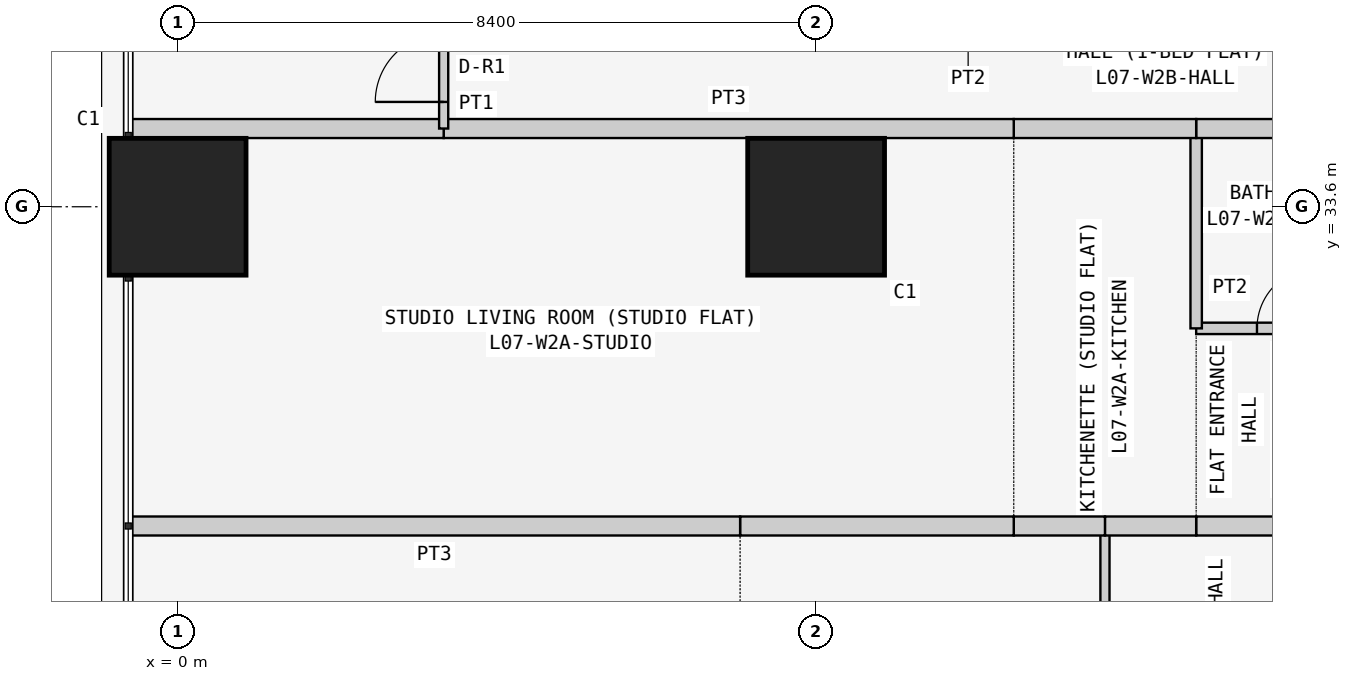
"""IFC4 building model, lengths in metres.
Left out: names, types, materials, properties, quantities, classifications, styles, units other than length and angle.
Written with IfcOpenShell. Run it as: python <this file> out.ifc"""

import sys

from ifc_helpers import new_model, si_unit, direction, frame, frame_2d, origin, origin_2d, place, context, subcontext, project, spatial, rectangle, extrude, element, fill, save


model = new_model("IFC4")
c1 = context("Model", 3, precision=1e-05, world=origin(), true_north=direction((0.0, 1.0)))
c2 = subcontext(c1, "Body", "Model", "MODEL_VIEW")
j1 = project(units=[si_unit("LENGTHUNIT", "METRE"), si_unit("PLANEANGLEUNIT", "RADIAN")], contexts=[c1])
p1 = place(None, origin())
s1 = spatial("IfcSite", under=j1, at=p1, CompositionType="ELEMENT")
p2 = place(p1, origin())
s2 = spatial("IfcBuilding", under=s1, at=p2, CompositionType="ELEMENT")
p3 = place(p2, frame((0.0, 0.0, 34.5)))
s3 = spatial("IfcBuildingStorey", under=s2, at=p3, CompositionType="ELEMENT", Elevation=34.5)
for number, where, z_axis, x_axis in (
    (1, (0.0, 33.6, 0.0), (0.0, 0.0, 1.0), (1.0, 0.0, 0.0)),
    (2, (8.4, 33.6, 0.0), (0.0, 0.0, 1.0), (1.0, 0.0, 0.0)),
):
    element("IfcColumn", number, at=place(p3, frame(where, z_axis=z_axis, x_axis=x_axis)), inside=s3, PredefinedType="COLUMN", context=c2, shape_type="SweptSolid", body=[
        extrude(rectangle(XDim=1.8, YDim=1.8, at=origin_2d()), origin(), (0.0, 0.0, 1.0), 3.6),
    ])
p4 = place(p3, frame((12.2, 29.4, 0.0), z_axis=(0.0, 0.0, 1.0), x_axis=(0.0, -1.0, 0.0)))
e3 = element("IfcWall", 3, at=p4, inside=s3, PredefinedType="PARTITIONING", context=c2, shape_type="SweptSolid", body=[
    extrude(rectangle(XDim=5.229, YDim=0.12, at=frame_2d((2.615, 0.0))), origin(), (0.0, 0.0, 1.0), 3.45),
])
p5 = place(p4, frame((1.05, 0.0, 0.0)))
e4 = element("IfcOpeningElement", 4, at=p5, cuts=e3, PredefinedType="OPENING", context=c2, shape_type="SweptSolid", body=[
    extrude(rectangle(XDim=0.9, YDim=2.1, at=frame_2d((0.45, 1.05))), frame((0.0, 0.07, 0.0), z_axis=(0.0, -1.0, 0.0), x_axis=(1.0, 0.0, 0.0)), (0.0, 0.0, 1.0), 0.14),
])
p6 = place(p3, frame((15.775, 29.4, 0.0), z_axis=(0.0, 0.0, 1.0), x_axis=(-1.0, 0.0, 0.0)))
e5 = element("IfcWall", 5, at=p6, inside=s3, PredefinedType="PARTITIONING", context=c2, shape_type="SweptSolid", body=[
    extrude(rectangle(XDim=2.375, YDim=0.25, at=frame_2d((1.188, 0.0))), origin(), (0.0, 0.0, 1.0), 3.45),
])
for number, where, z_axis, x_axis in (
    (6, (13.4, 29.4, 0.0), (0.0, 0.0, 1.0), (-1.0, 0.0, 0.0)),
    (7, (12.2, 29.4, 0.0), (0.0, 0.0, 1.0), (-1.0, 0.0, 0.0)),
):
    element("IfcWall", number, at=place(p3, frame(where, z_axis=z_axis, x_axis=x_axis)), inside=s3, PredefinedType="PARTITIONING", context=c2, shape_type="SweptSolid", body=[
        extrude(rectangle(XDim=1.2, YDim=0.25, at=frame_2d((0.6, 0.0))), origin(), (0.0, 0.0, 1.0), 3.45),
    ])
p7 = place(p3, frame((11.0, 29.4, 0.0), z_axis=(0.0, 0.0, 1.0), x_axis=(-1.0, 0.0, 0.0)))
e8 = element("IfcWall", 8, at=p7, inside=s3, PredefinedType="PARTITIONING", context=c2, shape_type="SweptSolid", body=[
    extrude(rectangle(XDim=3.6, YDim=0.25, at=frame_2d((1.8, 0.0))), origin(), (0.0, 0.0, 1.0), 3.45),
])
p8 = place(p3, frame((7.4, 29.4, 0.0), z_axis=(0.0, 0.0, 1.0), x_axis=(-1.0, 0.0, 0.0)))
e9 = element("IfcWall", 9, at=p8, inside=s3, PredefinedType="PARTITIONING", context=c2, shape_type="SweptSolid", body=[
    extrude(rectangle(XDim=8.05, YDim=0.25, at=frame_2d((4.025, 0.0))), origin(), (0.0, 0.0, 1.0), 3.45),
])
p9 = place(p3, frame((13.4, 32.0, 0.0), z_axis=(0.0, 0.0, 1.0), x_axis=(1.0, 0.0, 0.0)))
e10 = element("IfcWall", 10, at=p9, inside=s3, PredefinedType="PARTITIONING", context=c2, shape_type="SweptSolid", body=[
    extrude(rectangle(XDim=2.375, YDim=0.15, at=frame_2d((1.188, 0.0))), origin(), (0.0, 0.0, 1.0), 3.45),
])
p10 = place(p9, frame((0.8, 0.0, 0.0)))
e11 = element("IfcOpeningElement", 11, at=p10, cuts=e10, PredefinedType="OPENING", context=c2, shape_type="SweptSolid", body=[
    extrude(rectangle(XDim=0.8, YDim=2.1, at=frame_2d((0.4, 1.05))), frame((0.0, 0.085, 0.0), z_axis=(0.0, -1.0, 0.0), x_axis=(1.0, 0.0, 0.0)), (0.0, 0.0, 1.0), 0.17),
])
p11 = place(p3, frame((13.4, 32.0, 0.0), z_axis=(0.0, 0.0, 1.0), x_axis=(0.0, 1.0, 0.0)))
e12 = element("IfcWall", 12, at=p11, inside=s3, PredefinedType="PARTITIONING", context=c2, shape_type="SweptSolid", body=[
    extrude(rectangle(XDim=2.629, YDim=0.15, at=frame_2d((1.314, 0.0))), origin(), (0.0, 0.0, 1.0), 3.45),
])
p12 = place(p3, frame((13.4, 34.629, 0.0), z_axis=(0.0, 0.0, 1.0), x_axis=(1.0, 0.0, 0.0)))
e13 = element("IfcWall", 13, at=p12, inside=s3, PredefinedType="PARTITIONING", context=c2, shape_type="SweptSolid", body=[
    extrude(rectangle(XDim=2.375, YDim=0.25, at=frame_2d((1.188, 0.0))), origin(), (0.0, 0.0, 1.0), 3.45),
])
p13 = place(p3, frame((11.0, 34.629, 0.0), z_axis=(0.0, 0.0, 1.0), x_axis=(1.0, 0.0, 0.0)))
e14 = element("IfcWall", 14, at=p13, inside=s3, PredefinedType="PARTITIONING", context=c2, shape_type="SweptSolid", body=[
    extrude(rectangle(XDim=2.4, YDim=0.25, at=frame_2d((1.2, 0.0))), origin(), (0.0, 0.0, 1.0), 3.45),
])
p14 = place(p3, frame((3.5, 34.629, 0.0), z_axis=(0.0, 0.0, 1.0), x_axis=(1.0, 0.0, 0.0)))
e15 = element("IfcWall", 15, at=p14, inside=s3, PredefinedType="PARTITIONING", context=c2, shape_type="SweptSolid", body=[
    extrude(rectangle(XDim=7.5, YDim=0.25, at=frame_2d((3.75, 0.0))), origin(), (0.0, 0.0, 1.0), 3.45),
])
p15 = place(p3, frame((-0.65, 34.629, 0.0), z_axis=(0.0, 0.0, 1.0), x_axis=(1.0, 0.0, 0.0)))
e16 = element("IfcWall", 16, at=p15, inside=s3, PredefinedType="PARTITIONING", context=c2, shape_type="SweptSolid", body=[
    extrude(rectangle(XDim=4.15, YDim=0.25, at=frame_2d((2.075, 0.0))), origin(), (0.0, 0.0, 1.0), 3.45),
])
p16 = place(p3, frame((3.5, 34.629, 0.0), z_axis=(0.0, 0.0, 1.0), x_axis=(0.0, 1.0, 0.0)))
e17 = element("IfcWall", 17, at=p16, inside=s3, PredefinedType="PARTITIONING", context=c2, shape_type="SweptSolid", body=[
    extrude(rectangle(XDim=1.6, YDim=0.12, at=frame_2d((0.8, 0.0))), origin(), (0.0, 0.0, 1.0), 3.45),
])
p17 = place(p16, frame((0.35, 0.0, 0.0)))
e18 = element("IfcOpeningElement", 18, at=p17, cuts=e17, PredefinedType="OPENING", context=c2, shape_type="SweptSolid", body=[
    extrude(rectangle(XDim=0.9, YDim=2.1, at=frame_2d((0.45, 1.05))), frame((0.0, 0.07, 0.0), z_axis=(0.0, -1.0, 0.0), x_axis=(1.0, 0.0, 0.0)), (0.0, 0.0, 1.0), 0.14),
])
p18 = place(p10, origin())
e19 = element("IfcDoor", 19, at=p18, inside=s3, OperationType="SINGLE_SWING_RIGHT", PredefinedType="DOOR", context=c2, shape_type="SweptSolid", body=[
    extrude(rectangle(XDim=0.8, YDim=2.1, at=frame_2d((0.4, 1.05))), frame((0.0, 0.025, 0.0), z_axis=(0.0, -1.0, 0.0), x_axis=(1.0, 0.0, 0.0)), (0.0, 0.0, 1.0), 0.05),
])
fill(e11, e19)
p19 = place(p17, origin())
e20 = element("IfcDoor", 20, at=p19, inside=s3, OperationType="SINGLE_SWING_LEFT", PredefinedType="DOOR", context=c2, shape_type="SweptSolid", body=[
    extrude(rectangle(XDim=0.9, YDim=2.1, at=frame_2d((0.45, 1.05))), frame((0.0, 0.025, 0.0), z_axis=(0.0, -1.0, 0.0), x_axis=(1.0, 0.0, 0.0)), (0.0, 0.0, 1.0), 0.05),
])
fill(e18, e20)
save(model, sys.argv[1])
